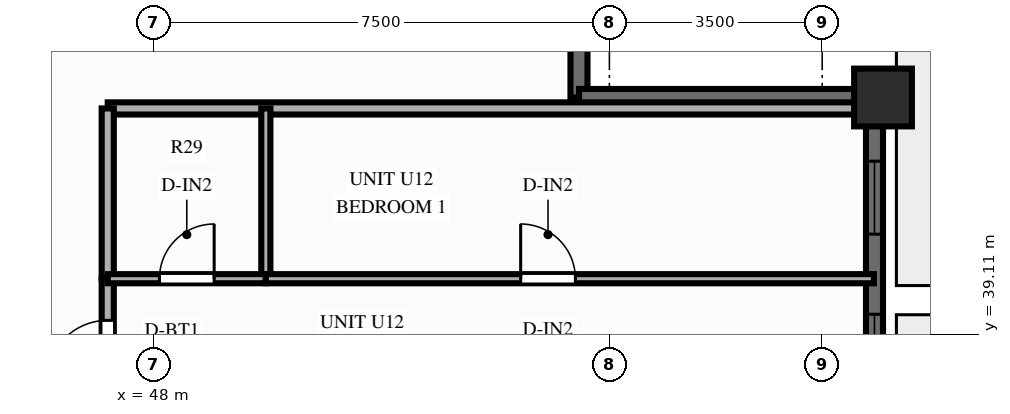
"""IFC4 building model, lengths in metres.
Left out: names, types, materials, properties, quantities, classifications, styles, units other than length and angle.
Written with IfcOpenShell. Run it as: python <this file> out.ifc"""

import sys

from ifc_helpers import new_model, si_unit, direction, frame, frame_2d, origin, origin_2d, place, context, subcontext, project, spatial, rectangle, extrude, source, transform, mapped, element, fill, save


model = new_model("IFC4")
c1 = context("Model", 3, precision=1e-05, world=origin(), true_north=direction((0.0, 1.0)))
c2 = subcontext(c1, "Body", "Model", "MODEL_VIEW")
j1 = project(units=[si_unit("LENGTHUNIT", "METRE"), si_unit("PLANEANGLEUNIT", "RADIAN")], contexts=[c1])
p1 = place(None, origin())
s1 = spatial("IfcSite", under=j1, at=p1, CompositionType="ELEMENT")
p2 = place(p1, origin())
s2 = spatial("IfcBuilding", under=s1, at=p2, CompositionType="ELEMENT")
p3 = place(p2, frame((0.0, 0.0, 152.2)))
s3 = spatial("IfcBuildingStorey", under=s2, at=p3, CompositionType="ELEMENT", Elevation=152.2)
m1 = source(origin(), c2, "Body", "SweptSolid", [
    extrude(rectangle(XDim=0.95, YDim=0.95, at=origin_2d()), origin(), (0.0, 0.0, 1.0), 3.9),
])
p4 = place(p3, frame((60.0, 43.0, 0.0), z_axis=(0.0, 0.0, 1.0), x_axis=(1.0, 0.0, 0.0)))
e1 = element("IfcColumn", 1, at=p4, inside=s3, PredefinedType="COLUMN", context=c2, shape_type="MappedRepresentation", body=[
    mapped(m1, transform((0.0, 0.0, 0.0), scale=1.0)),
])
p5 = place(p3, frame((59.86, 11.0, 0.0), z_axis=(0.0, 0.0, 1.0), x_axis=(0.0, 1.0, 0.0)))
e2 = element("IfcWall", 2, at=p5, inside=s3, PredefinedType="SOLIDWALL", context=c2, shape_type="SweptSolid", body=[
    extrude(rectangle(XDim=32.0, YDim=0.28, at=frame_2d((16.0, 0.0))), origin(), (0.0, 0.0, 1.0), 2.44),
])
p6 = place(p5, frame((0.748, 0.0, 0.25)))
e3 = element("IfcOpeningElement", 3, at=p6, cuts=e2, PredefinedType="OPENING", context=c2, shape_type="SweptSolid", body=[
    extrude(rectangle(XDim=1.2, YDim=1.5, at=frame_2d((0.6, 0.75))), frame((0.0, 0.152, 0.0), z_axis=(0.0, -1.0, 0.0), x_axis=(1.0, 0.0, 0.0)), (0.0, 0.0, 1.0), 0.304),
])
p7 = place(p5, frame((2.965, 0.0, 0.25)))
e4 = element("IfcOpeningElement", 4, at=p7, cuts=e2, PredefinedType="OPENING", context=c2, shape_type="SweptSolid", body=[
    extrude(rectangle(XDim=1.2, YDim=1.5, at=frame_2d((0.6, 0.75))), frame((0.0, 0.152, 0.0), z_axis=(0.0, -1.0, 0.0), x_axis=(1.0, 0.0, 0.0)), (0.0, 0.0, 1.0), 0.304),
])
p8 = place(p5, frame((5.117, 0.0, 0.25)))
e5 = element("IfcOpeningElement", 5, at=p8, cuts=e2, PredefinedType="OPENING", context=c2, shape_type="SweptSolid", body=[
    extrude(rectangle(XDim=1.2, YDim=1.5, at=frame_2d((0.6, 0.75))), frame((0.0, 0.152, 0.0), z_axis=(0.0, -1.0, 0.0), x_axis=(1.0, 0.0, 0.0)), (0.0, 0.0, 1.0), 0.304),
])
p9 = place(p5, frame((8.05, 0.0, 0.25)))
e6 = element("IfcOpeningElement", 6, at=p9, cuts=e2, PredefinedType="OPENING", context=c2, shape_type="SweptSolid", body=[
    extrude(rectangle(XDim=1.2, YDim=1.5, at=frame_2d((0.6, 0.75))), frame((0.0, 0.152, 0.0), z_axis=(0.0, -1.0, 0.0), x_axis=(1.0, 0.0, 0.0)), (0.0, 0.0, 1.0), 0.304),
])
p10 = place(p5, frame((10.335, 0.0, 0.25)))
e7 = element("IfcOpeningElement", 7, at=p10, cuts=e2, PredefinedType="OPENING", context=c2, shape_type="SweptSolid", body=[
    extrude(rectangle(XDim=1.2, YDim=1.5, at=frame_2d((0.6, 0.75))), frame((0.0, 0.152, 0.0), z_axis=(0.0, -1.0, 0.0), x_axis=(1.0, 0.0, 0.0)), (0.0, 0.0, 1.0), 0.304),
])
p11 = place(p5, frame((12.92, 0.0, 0.25)))
e8 = element("IfcOpeningElement", 8, at=p11, cuts=e2, PredefinedType="OPENING", context=c2, shape_type="SweptSolid", body=[
    extrude(rectangle(XDim=1.2, YDim=1.5, at=frame_2d((0.6, 0.75))), frame((0.0, 0.152, 0.0), z_axis=(0.0, -1.0, 0.0), x_axis=(1.0, 0.0, 0.0)), (0.0, 0.0, 1.0), 0.304),
])
p12 = place(p5, frame((15.4, 0.0, 0.25)))
e9 = element("IfcOpeningElement", 9, at=p12, cuts=e2, PredefinedType="OPENING", context=c2, shape_type="SweptSolid", body=[
    extrude(rectangle(XDim=1.2, YDim=1.5, at=frame_2d((0.6, 0.75))), frame((0.0, 0.152, 0.0), z_axis=(0.0, -1.0, 0.0), x_axis=(1.0, 0.0, 0.0)), (0.0, 0.0, 1.0), 0.304),
])
p13 = place(p5, frame((17.58, 0.0, 0.25)))
e10 = element("IfcOpeningElement", 10, at=p13, cuts=e2, PredefinedType="OPENING", context=c2, shape_type="SweptSolid", body=[
    extrude(rectangle(XDim=1.2, YDim=1.5, at=frame_2d((0.6, 0.75))), frame((0.0, 0.152, 0.0), z_axis=(0.0, -1.0, 0.0), x_axis=(1.0, 0.0, 0.0)), (0.0, 0.0, 1.0), 0.304),
])
p14 = place(p5, frame((19.865, 0.0, 0.25)))
e11 = element("IfcOpeningElement", 11, at=p14, cuts=e2, PredefinedType="OPENING", context=c2, shape_type="SweptSolid", body=[
    extrude(rectangle(XDim=1.2, YDim=1.5, at=frame_2d((0.6, 0.75))), frame((0.0, 0.152, 0.0), z_axis=(0.0, -1.0, 0.0), x_axis=(1.0, 0.0, 0.0)), (0.0, 0.0, 1.0), 0.304),
])
p15 = place(p5, frame((22.45, 0.0, 0.25)))
e12 = element("IfcOpeningElement", 12, at=p15, cuts=e2, PredefinedType="OPENING", context=c2, shape_type="SweptSolid", body=[
    extrude(rectangle(XDim=1.2, YDim=1.5, at=frame_2d((0.6, 0.75))), frame((0.0, 0.152, 0.0), z_axis=(0.0, -1.0, 0.0), x_axis=(1.0, 0.0, 0.0)), (0.0, 0.0, 1.0), 0.304),
])
p16 = place(p5, frame((25.633, 0.0, 0.25)))
e13 = element("IfcOpeningElement", 13, at=p16, cuts=e2, PredefinedType="OPENING", context=c2, shape_type="SweptSolid", body=[
    extrude(rectangle(XDim=0.7, YDim=1.5, at=frame_2d((0.35, 0.75))), frame((0.0, 0.152, 0.0), z_axis=(0.0, -1.0, 0.0), x_axis=(1.0, 0.0, 0.0)), (0.0, 0.0, 1.0), 0.304),
])
p17 = place(p5, frame((27.235, 0.0, 0.25)))
e14 = element("IfcOpeningElement", 14, at=p17, cuts=e2, PredefinedType="OPENING", context=c2, shape_type="SweptSolid", body=[
    extrude(rectangle(XDim=1.2, YDim=1.5, at=frame_2d((0.6, 0.75))), frame((0.0, 0.152, 0.0), z_axis=(0.0, -1.0, 0.0), x_axis=(1.0, 0.0, 0.0)), (0.0, 0.0, 1.0), 0.304),
])
p18 = place(p5, frame((29.752, 0.0, 0.25)))
e15 = element("IfcOpeningElement", 15, at=p18, cuts=e2, PredefinedType="OPENING", context=c2, shape_type="SweptSolid", body=[
    extrude(rectangle(XDim=1.2, YDim=1.5, at=frame_2d((0.6, 0.75))), frame((0.0, 0.152, 0.0), z_axis=(0.0, -1.0, 0.0), x_axis=(1.0, 0.0, 0.0)), (0.0, 0.0, 1.0), 0.304),
])
for number, where, z_axis, x_axis in (
    (16, (55.0, 43.0, 0.0), (0.0, 0.0, 1.0), (0.0, 1.0, 0.0)),
    (17, (55.0, 43.0, 0.0), (0.0, 0.0, 1.0), (1.0, 0.0, 0.0)),
):
    element("IfcWall", number, at=place(p3, frame(where, z_axis=z_axis, x_axis=x_axis)), inside=s3, PredefinedType="SOLIDWALL", context=c2, shape_type="SweptSolid", body=[
        extrude(rectangle(XDim=4.92, YDim=0.28, at=frame_2d((2.46, 0.0))), origin(), (0.0, 0.0, 1.0), 2.44),
    ])
p19 = place(p3, frame((47.25, 42.82, 0.0), z_axis=(0.0, 0.0, 1.0), x_axis=(1.0, 0.0, 0.0)))
e18 = element("IfcWall", 18, at=p19, inside=s3, PredefinedType="PARTITIONING", context=c2, shape_type="SweptSolid", body=[
    extrude(rectangle(XDim=12.6, YDim=0.2, at=frame_2d((6.3, 0.0))), origin(), (0.0, 0.0, 1.0), 3.56),
])
p20 = place(p3, frame((47.25, 37.65, 0.0), z_axis=(0.0, 0.0, 1.0), x_axis=(0.0, 1.0, 0.0)))
e19 = element("IfcWall", 19, at=p20, inside=s3, PredefinedType="PARTITIONING", context=c2, shape_type="SweptSolid", body=[
    extrude(rectangle(XDim=2.369, YDim=0.2, at=frame_2d((1.185, 0.0))), origin(), (0.0, 0.0, 1.0), 3.56),
])
p21 = place(p20, frame((0.685, 0.0, 0.0)))
e20 = element("IfcOpeningElement", 20, at=p21, cuts=e19, PredefinedType="OPENING", context=c2, shape_type="SweptSolid", body=[
    extrude(rectangle(XDim=1.0, YDim=2.15, at=frame_2d((0.5, 1.075))), frame((0.0, 0.112, 0.0), z_axis=(0.0, -1.0, 0.0), x_axis=(1.0, 0.0, 0.0)), (0.0, 0.0, 1.0), 0.224),
])
p22 = place(p3, frame((47.25, 40.019, 0.0), z_axis=(0.0, 0.0, 1.0), x_axis=(0.0, 1.0, 0.0)))
e21 = element("IfcWall", 21, at=p22, inside=s3, PredefinedType="PARTITIONING", context=c2, shape_type="SweptSolid", body=[
    extrude(rectangle(XDim=2.801, YDim=0.2, at=frame_2d((1.4, 0.0))), origin(), (0.0, 0.0, 1.0), 3.56),
])
p23 = place(p3, frame((49.85, 40.019, 0.0), z_axis=(0.0, 0.0, 1.0), x_axis=(0.0, 1.0, 0.0)))
e22 = element("IfcWall", 22, at=p23, inside=s3, PredefinedType="PARTITIONING", context=c2, shape_type="SweptSolid", body=[
    extrude(rectangle(XDim=2.801, YDim=0.15, at=frame_2d((1.4, 0.0))), origin(), (0.0, 0.0, 1.0), 3.56),
])
p24 = place(p3, frame((47.25, 40.019, 0.0), z_axis=(0.0, 0.0, 1.0), x_axis=(1.0, 0.0, 0.0)))
e23 = element("IfcWall", 23, at=p24, inside=s3, PredefinedType="PARTITIONING", context=c2, shape_type="SweptSolid", body=[
    extrude(rectangle(XDim=2.6, YDim=0.15, at=frame_2d((1.3, 0.0))), origin(), (0.0, 0.0, 1.0), 3.56),
])
p25 = place(p24, frame((0.85, 0.0, 0.0)))
e24 = element("IfcOpeningElement", 24, at=p25, cuts=e23, PredefinedType="OPENING", context=c2, shape_type="SweptSolid", body=[
    extrude(rectangle(XDim=0.9, YDim=2.1, at=frame_2d((0.45, 1.05))), frame((0.0, 0.087, 0.0), z_axis=(0.0, -1.0, 0.0), x_axis=(1.0, 0.0, 0.0)), (0.0, 0.0, 1.0), 0.174),
])
p26 = place(p3, frame((49.85, 40.019, 0.0), z_axis=(0.0, 0.0, 1.0), x_axis=(1.0, 0.0, 0.0)))
e25 = element("IfcWall", 25, at=p26, inside=s3, PredefinedType="PARTITIONING", context=c2, shape_type="SweptSolid", body=[
    extrude(rectangle(XDim=10.0, YDim=0.15, at=frame_2d((5.0, 0.0))), origin(), (0.0, 0.0, 1.0), 3.56),
])
p27 = place(p26, frame((4.191, 0.0, 0.0)))
e26 = element("IfcOpeningElement", 26, at=p27, cuts=e25, PredefinedType="OPENING", context=c2, shape_type="SweptSolid", body=[
    extrude(rectangle(XDim=0.9, YDim=2.1, at=frame_2d((0.45, 1.05))), frame((0.0, 0.087, 0.0), z_axis=(0.0, -1.0, 0.0), x_axis=(1.0, 0.0, 0.0)), (0.0, 0.0, 1.0), 0.174),
])
m2 = source(origin(), c2, "Body", "SweptSolid", [
    extrude(rectangle(XDim=1.2, YDim=1.5, at=frame_2d((0.6, 0.75))), frame((0.0, 0.03, 0.0), z_axis=(0.0, -1.0, 0.0), x_axis=(1.0, 0.0, 0.0)), (0.0, 0.0, 1.0), 0.06),
])
p28 = place(p17, origin())
e27 = element("IfcWindow", 27, at=p28, inside=s3, PartitioningType="SINGLE_PANEL", PredefinedType="WINDOW", context=c2, shape_type="MappedRepresentation", body=[
    mapped(m2, transform((0.0, 0.0, 0.0), scale=1.0)),
])
fill(e14, e27)
p29 = place(p18, origin())
e28 = element("IfcWindow", 28, at=p29, inside=s3, PartitioningType="SINGLE_PANEL", PredefinedType="WINDOW", context=c2, shape_type="MappedRepresentation", body=[
    mapped(m2, transform((0.0, 0.0, 0.0), scale=1.0)),
])
fill(e15, e28)
m3 = source(origin(), c2, "Body", "SweptSolid", [
    extrude(rectangle(XDim=1.0, YDim=2.15, at=frame_2d((0.5, 1.075))), frame((0.0, 0.025, 0.0), z_axis=(0.0, -1.0, 0.0), x_axis=(1.0, 0.0, 0.0)), (0.0, 0.0, 1.0), 0.05),
])
p30 = place(p21, origin())
e29 = element("IfcDoor", 29, at=p30, inside=s3, OperationType="SINGLE_SWING_LEFT", PredefinedType="DOOR", context=c2, shape_type="MappedRepresentation", body=[
    mapped(m3, transform((0.0, 0.0, 0.0), scale=1.0)),
])
fill(e20, e29)
m4 = source(origin(), c2, "Body", "SweptSolid", [
    extrude(rectangle(XDim=0.9, YDim=2.1, at=frame_2d((0.45, 1.05))), frame((0.0, 0.025, 0.0), z_axis=(0.0, -1.0, 0.0), x_axis=(1.0, 0.0, 0.0)), (0.0, 0.0, 1.0), 0.05),
])
p31 = place(p25, origin())
e30 = element("IfcDoor", 30, at=p31, inside=s3, OperationType="SINGLE_SWING_RIGHT", PredefinedType="DOOR", context=c2, shape_type="MappedRepresentation", body=[
    mapped(m4, transform((0.0, 0.0, 0.0), scale=1.0)),
])
fill(e24, e30)
p32 = place(p27, origin())
e31 = element("IfcDoor", 31, at=p32, inside=s3, OperationType="SINGLE_SWING_LEFT", PredefinedType="DOOR", context=c2, shape_type="MappedRepresentation", body=[
    mapped(m4, transform((0.0, 0.0, 0.0), scale=1.0)),
])
fill(e26, e31)
save(model, sys.argv[1])
